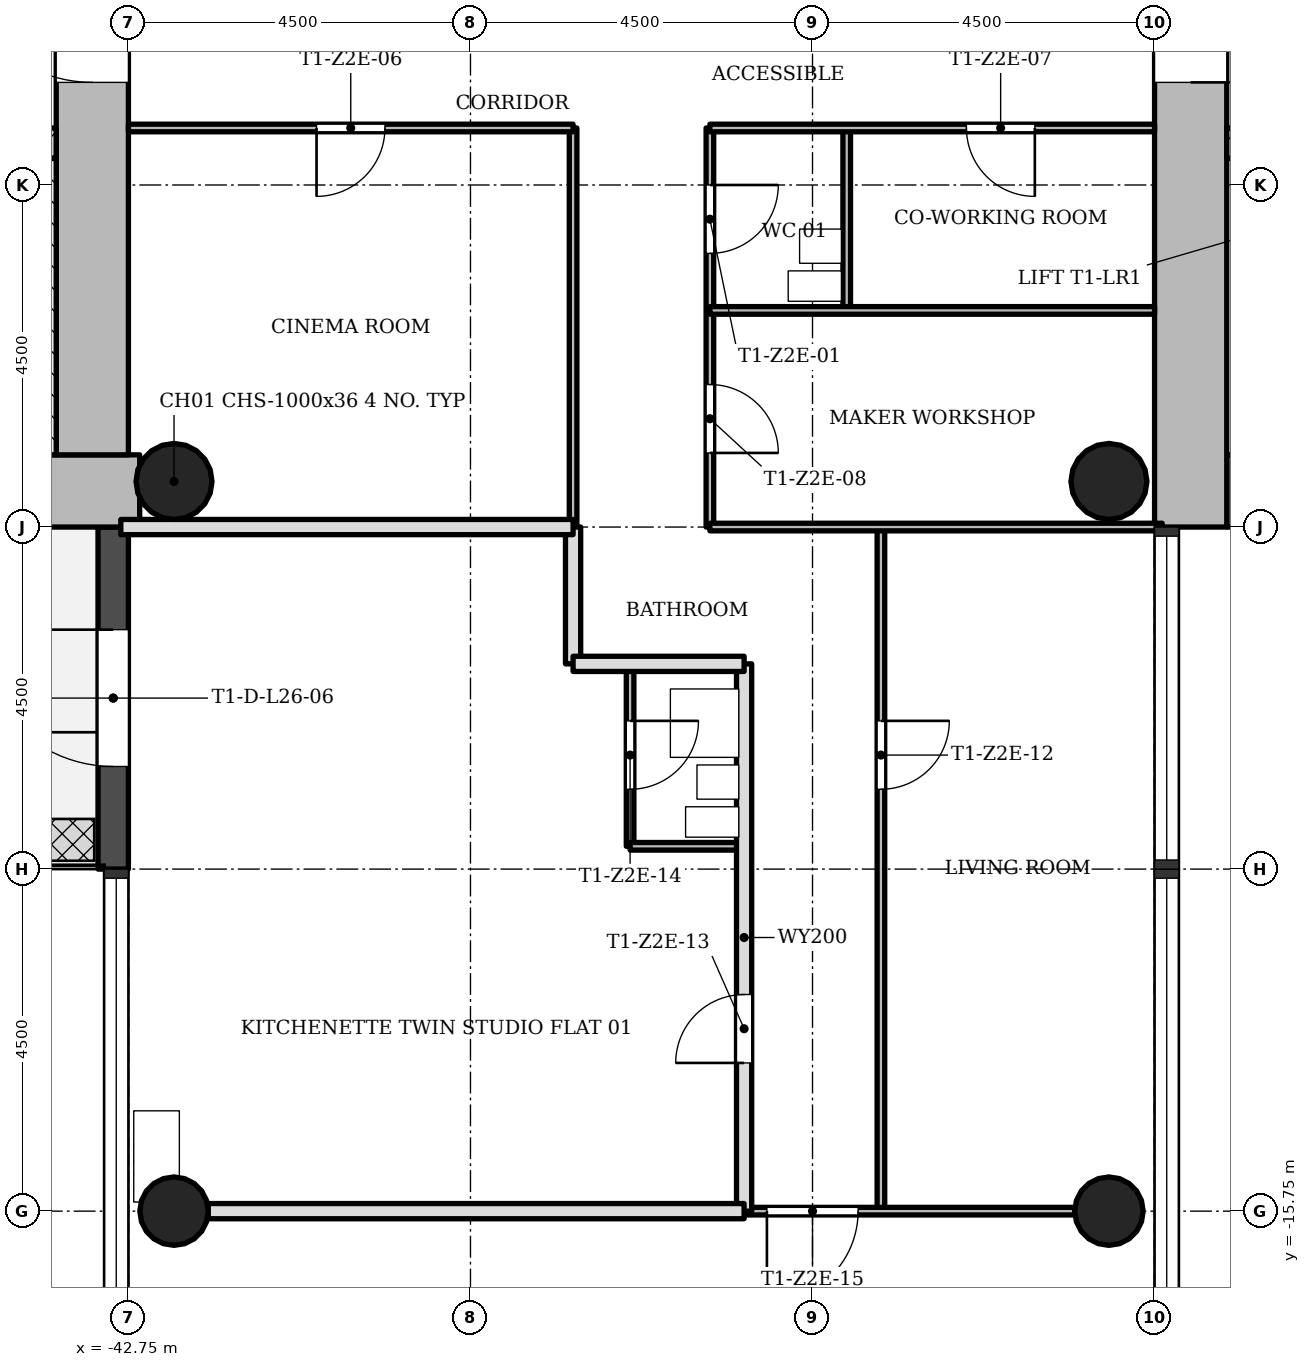
"""IFC4 building model, lengths in metres.
Left out: names, types, materials, properties, quantities, classifications, styles, units other than length and angle.
Written with IfcOpenShell. Run it as: python <this file> out.ifc"""

import sys

from ifc_helpers import new_model, si_unit, direction, frame, frame_2d, origin, origin_2d, place, context, subcontext, project, spatial, rectangle, hollow_circle, extrude, element, fill, save


model = new_model("IFC4")
c1 = context("Model", 3, precision=1e-05, world=origin(), true_north=direction((0.0, 1.0)))
c2 = subcontext(c1, "Body", "Model", "MODEL_VIEW")
j1 = project(units=[si_unit("LENGTHUNIT", "METRE"), si_unit("PLANEANGLEUNIT", "RADIAN")], contexts=[c1])
p1 = place(None, origin())
s1 = spatial("IfcSite", under=j1, at=p1, CompositionType="ELEMENT")
p2 = place(p1, origin())
s2 = spatial("IfcBuilding", under=s1, at=p2, CompositionType="ELEMENT")
p3 = place(p2, frame((0.0, 0.0, 97.0)))
s3 = spatial("IfcBuildingStorey", under=s2, at=p3, CompositionType="ELEMENT", Elevation=97.0)
p4 = place(p3, frame((-28.3, -6.275, 0.0), z_axis=(0.0, 0.0, 1.0), x_axis=(1.0, 0.0, 0.0)))
e1 = element("IfcWall", 1, at=p4, inside=s3, PredefinedType="SHEAR", context=c2, shape_type="SweptSolid", body=[
    extrude(rectangle(XDim=8.05, YDim=0.95, at=frame_2d((4.025, 0.0))), origin(), (0.0, 0.0, 1.0), 3.4),
])
p5 = place(p3, frame((-28.775, 5.8, 0.0), z_axis=(0.0, 0.0, 1.0), x_axis=(0.0, -1.0, 0.0)))
e2 = element("IfcWall", 2, at=p5, inside=s3, PredefinedType="SHEAR", context=c2, shape_type="SweptSolid", body=[
    extrude(rectangle(XDim=12.55, YDim=0.95, at=frame_2d((6.275, 0.0))), origin(), (0.0, 0.0, 1.0), 3.4),
])
p6 = place(p5, frame((4.9, 0.0, 0.0)))
e3 = element("IfcOpeningElement", 3, at=p6, cuts=e2, PredefinedType="OPENING", context=c2, shape_type="SweptSolid", body=[
    extrude(rectangle(XDim=1.8, YDim=2.1, at=frame_2d((0.9, 1.05))), frame((0.0, 0.485, 0.0), z_axis=(0.0, -1.0, 0.0), x_axis=(1.0, 0.0, 0.0)), (0.0, 0.0, 1.0), 0.97),
])
p7 = place(p3, frame((-28.3, -1.7, 0.0), z_axis=(0.0, 0.0, 1.0), x_axis=(1.0, 0.0, 0.0)))
e4 = element("IfcWall", 4, at=p7, inside=s3, PredefinedType="SHEAR", context=c2, shape_type="SweptSolid", body=[
    extrude(rectangle(XDim=7.1, YDim=0.4, at=frame_2d((3.55, 0.0))), origin(), (0.0, 0.0, 1.0), 3.4),
])
p8 = place(p7, frame((0.8, 0.0, 0.0)))
e5 = element("IfcOpeningElement", 5, at=p8, cuts=e4, PredefinedType="OPENING", context=c2, shape_type="SweptSolid", body=[
    extrude(rectangle(XDim=1.1, YDim=2.1, at=frame_2d((0.55, 1.05))), frame((0.0, 0.21, 0.0), z_axis=(0.0, -1.0, 0.0), x_axis=(1.0, 0.0, 0.0)), (0.0, 0.0, 1.0), 0.42),
])
p9 = place(p7, frame((3.0, 0.0, 0.0)))
e6 = element("IfcOpeningElement", 6, at=p9, cuts=e4, PredefinedType="OPENING", context=c2, shape_type="SweptSolid", body=[
    extrude(rectangle(XDim=1.1, YDim=2.1, at=frame_2d((0.55, 1.05))), frame((0.0, 0.21, 0.0), z_axis=(0.0, -1.0, 0.0), x_axis=(1.0, 0.0, 0.0)), (0.0, 0.0, 1.0), 0.42),
])
p10 = place(p7, frame((5.2, 0.0, 0.0)))
e7 = element("IfcOpeningElement", 7, at=p10, cuts=e4, PredefinedType="OPENING", context=c2, shape_type="SweptSolid", body=[
    extrude(rectangle(XDim=1.1, YDim=2.1, at=frame_2d((0.55, 1.05))), frame((0.0, 0.21, 0.0), z_axis=(0.0, -1.0, 0.0), x_axis=(1.0, 0.0, 0.0)), (0.0, 0.0, 1.0), 0.42),
])
p11 = place(p3, frame((-51.298, -6.275, 0.0), z_axis=(0.0, 0.0, 1.0), x_axis=(1.0, 0.0, 0.0)))
e8 = element("IfcWall", 8, at=p11, inside=s3, PredefinedType="SHEAR", context=c2, shape_type="SweptSolid", body=[
    extrude(rectangle(XDim=8.696, YDim=0.95, at=frame_2d((4.348, 0.0))), origin(), (0.0, 0.0, 1.0), 3.4),
])
p12 = place(p3, frame((-43.225, -5.8, 0.0), z_axis=(0.0, 0.0, 1.0), x_axis=(0.0, 1.0, 0.0)))
e9 = element("IfcWall", 9, at=p12, inside=s3, PredefinedType="SHEAR", context=c2, shape_type="SweptSolid", body=[
    extrude(rectangle(XDim=12.55, YDim=0.95, at=frame_2d((6.275, 0.0))), origin(), (0.0, 0.0, 1.0), 3.4),
])
p13 = place(p12, frame((4.9, 0.0, 0.0)))
e10 = element("IfcOpeningElement", 10, at=p13, cuts=e9, PredefinedType="OPENING", context=c2, shape_type="SweptSolid", body=[
    extrude(rectangle(XDim=1.8, YDim=2.1, at=frame_2d((0.9, 1.05))), frame((0.0, 0.485, 0.0), z_axis=(0.0, -1.0, 0.0), x_axis=(1.0, 0.0, 0.0)), (0.0, 0.0, 1.0), 0.97),
])
p14 = place(p3, frame((-50.8, -1.7, 0.0), z_axis=(0.0, 0.0, 1.0), x_axis=(1.0, 0.0, 0.0)))
e11 = element("IfcWall", 11, at=p14, inside=s3, PredefinedType="SHEAR", context=c2, shape_type="SweptSolid", body=[
    extrude(rectangle(XDim=7.1, YDim=0.4, at=frame_2d((3.55, 0.0))), origin(), (0.0, 0.0, 1.0), 3.4),
])
p15 = place(p14, frame((5.5, 0.0, 0.0)))
e12 = element("IfcOpeningElement", 12, at=p15, cuts=e11, PredefinedType="OPENING", context=c2, shape_type="SweptSolid", body=[
    extrude(rectangle(XDim=0.9, YDim=2.1, at=frame_2d((0.45, 1.05))), frame((0.0, 0.21, 0.0), z_axis=(0.0, -1.0, 0.0), x_axis=(1.0, 0.0, 0.0)), (0.0, 0.0, 1.0), 0.42),
])
for number, where, z_axis, x_axis in (
    (13, (-42.15, -15.75, 0.0), (0.0, 0.0, 1.0), (1.0, 0.0, 0.0)),
    (14, (-29.85, -15.75, 0.0), (0.0, 0.0, 1.0), (1.0, 0.0, 0.0)),
):
    element("IfcColumn", number, at=place(p3, frame(where, z_axis=z_axis, x_axis=x_axis)), inside=s3, PredefinedType="COLUMN", context=c2, shape_type="SweptSolid", body=[
        extrude(hollow_circle(Radius=0.45, WallThickness=0.032, at=origin_2d()), origin(), (0.0, 0.0, 1.0), 3.4),
    ])
for number, where, z_axis, x_axis in (
    (15, (-42.15, -6.15, 0.0), (0.0, 0.0, 1.0), (1.0, 0.0, 0.0)),
    (16, (-29.85, -6.15, 0.0), (0.0, 0.0, 1.0), (1.0, 0.0, 0.0)),
):
    element("IfcColumn", number, at=place(p3, frame(where, z_axis=z_axis, x_axis=x_axis)), inside=s3, PredefinedType="COLUMN", context=c2, shape_type="SweptSolid", body=[
        extrude(hollow_circle(Radius=0.5, WallThickness=0.036, at=origin_2d()), origin(), (0.0, 0.0, 1.0), 3.4),
    ])
p16 = place(p3, frame((-42.95, -6.75, -0.02), z_axis=(0.0, 0.0, 1.0), x_axis=(0.0, -1.0, 0.0)))
e17 = element("IfcWall", 17, at=p16, inside=s3, PredefinedType="STANDARD", context=c2, shape_type="SweptSolid", body=[
    extrude(rectangle(XDim=4.5, YDim=0.4, at=frame_2d((2.25, 0.0))), origin(), (0.0, 0.0, 1.0), 3.12),
])
p17 = place(p16, frame((1.35, 0.0, 0.02)))
e18 = element("IfcOpeningElement", 18, at=p17, cuts=e17, PredefinedType="OPENING", context=c2, shape_type="SweptSolid", body=[
    extrude(rectangle(XDim=1.8, YDim=2.1, at=frame_2d((0.9, 1.05))), frame((0.0, 0.21, 0.0), z_axis=(0.0, -1.0, 0.0), x_axis=(1.0, 0.0, 0.0)), (0.0, 0.0, 1.0), 0.42),
])
p18 = place(p3, frame((-36.9, -6.75, 0.0), z_axis=(0.0, 0.0, 1.0), x_axis=(0.0, 1.0, 0.0)))
e19 = element("IfcWall", 19, at=p18, inside=s3, PredefinedType="PARTITIONING", context=c2, shape_type="SweptSolid", body=[
    extrude(rectangle(XDim=5.25, YDim=0.1, at=frame_2d((2.625, 0.0))), origin(), (0.0, 0.0, 1.0), 3.0),
])
p19 = place(p3, frame((-36.9, -8.55, 0.0), z_axis=(0.0, 0.0, 1.0), x_axis=(0.0, 1.0, 0.0)))
e20 = element("IfcWall", 20, at=p19, inside=s3, PredefinedType="SOLIDWALL", context=c2, shape_type="SweptSolid", body=[
    extrude(rectangle(XDim=1.8, YDim=0.2, at=frame_2d((0.9, 0.0))), origin(), (0.0, 0.0, 1.0), 3.0),
])
p20 = place(p3, frame((-36.15, -10.95, 0.0), z_axis=(0.0, 0.0, 1.0), x_axis=(0.0, 1.0, 0.0)))
e21 = element("IfcWall", 21, at=p20, inside=s3, PredefinedType="PARTITIONING", context=c2, shape_type="SweptSolid", body=[
    extrude(rectangle(XDim=2.4, YDim=0.1, at=frame_2d((1.2, 0.0))), origin(), (0.0, 0.0, 1.0), 3.0),
])
p21 = place(p20, frame((0.75, 0.0, 0.0)))
e22 = element("IfcOpeningElement", 22, at=p21, cuts=e21, PredefinedType="OPENING", context=c2, shape_type="SweptSolid", body=[
    extrude(rectangle(XDim=0.9, YDim=2.1, at=frame_2d((0.45, 1.05))), frame((0.0, 0.06, 0.0), z_axis=(0.0, -1.0, 0.0), x_axis=(1.0, 0.0, 0.0)), (0.0, 0.0, 1.0), 0.12),
])
p22 = place(p3, frame((-35.1, -6.75, 0.0), z_axis=(0.0, 0.0, 1.0), x_axis=(0.0, 1.0, 0.0)))
e23 = element("IfcWall", 23, at=p22, inside=s3, PredefinedType="PARTITIONING", context=c2, shape_type="SweptSolid", body=[
    extrude(rectangle(XDim=5.25, YDim=0.1, at=frame_2d((2.625, 0.0))), origin(), (0.0, 0.0, 1.0), 3.0),
])
p23 = place(p22, frame((3.6, 0.0, 0.0)))
e24 = element("IfcOpeningElement", 24, at=p23, cuts=e23, PredefinedType="OPENING", context=c2, shape_type="SweptSolid", body=[
    extrude(rectangle(XDim=0.9, YDim=2.1, at=frame_2d((0.45, 1.05))), frame((0.0, 0.06, 0.0), z_axis=(0.0, -1.0, 0.0), x_axis=(1.0, 0.0, 0.0)), (0.0, 0.0, 1.0), 0.12),
])
p24 = place(p22, frame((0.975, 0.0, 0.0)))
e25 = element("IfcOpeningElement", 25, at=p24, cuts=e23, PredefinedType="OPENING", context=c2, shape_type="SweptSolid", body=[
    extrude(rectangle(XDim=0.9, YDim=2.1, at=frame_2d((0.45, 1.05))), frame((0.0, 0.06, 0.0), z_axis=(0.0, -1.0, 0.0), x_axis=(1.0, 0.0, 0.0)), (0.0, 0.0, 1.0), 0.12),
])
p25 = place(p3, frame((-34.65, -15.75, 0.0), z_axis=(0.0, 0.0, 1.0), x_axis=(0.0, 1.0, 0.0)))
e26 = element("IfcWall", 26, at=p25, inside=s3, PredefinedType="SOLIDWALL", context=c2, shape_type="SweptSolid", body=[
    extrude(rectangle(XDim=7.2, YDim=0.2, at=frame_2d((3.6, 0.0))), origin(), (0.0, 0.0, 1.0), 3.0),
])
p26 = place(p25, frame((1.95, 0.0, 0.0)))
e27 = element("IfcOpeningElement", 27, at=p26, cuts=e26, PredefinedType="OPENING", context=c2, shape_type="SweptSolid", body=[
    extrude(rectangle(XDim=0.9, YDim=2.1, at=frame_2d((0.45, 1.05))), frame((0.0, 0.11, 0.0), z_axis=(0.0, -1.0, 0.0), x_axis=(1.0, 0.0, 0.0)), (0.0, 0.0, 1.0), 0.22),
])
p27 = place(p3, frame((-33.3, -3.9, 0.0), z_axis=(0.0, 0.0, 1.0), x_axis=(0.0, 1.0, 0.0)))
e28 = element("IfcWall", 28, at=p27, inside=s3, PredefinedType="PARTITIONING", context=c2, shape_type="SweptSolid", body=[
    extrude(rectangle(XDim=2.4, YDim=0.1, at=frame_2d((1.2, 0.0))), origin(), (0.0, 0.0, 1.0), 3.0),
])
p28 = place(p3, frame((-32.85, -15.75, 0.0), z_axis=(0.0, 0.0, 1.0), x_axis=(0.0, 1.0, 0.0)))
e29 = element("IfcWall", 29, at=p28, inside=s3, PredefinedType="PARTITIONING", context=c2, shape_type="SweptSolid", body=[
    extrude(rectangle(XDim=9.0, YDim=0.1, at=frame_2d((4.5, 0.0))), origin(), (0.0, 0.0, 1.0), 3.0),
])
p29 = place(p28, frame((5.55, 0.0, 0.0)))
e30 = element("IfcOpeningElement", 30, at=p29, cuts=e29, PredefinedType="OPENING", context=c2, shape_type="SweptSolid", body=[
    extrude(rectangle(XDim=0.9, YDim=2.1, at=frame_2d((0.45, 1.05))), frame((0.0, 0.06, 0.0), z_axis=(0.0, -1.0, 0.0), x_axis=(1.0, 0.0, 0.0)), (0.0, 0.0, 1.0), 0.12),
])
p30 = place(p3, frame((-34.65, -15.75, 0.0), z_axis=(0.0, 0.0, 1.0), x_axis=(1.0, 0.0, 0.0)))
e31 = element("IfcWall", 31, at=p30, inside=s3, PredefinedType="PARTITIONING", context=c2, shape_type="SweptSolid", body=[
    extrude(rectangle(XDim=4.35, YDim=0.1, at=frame_2d((2.175, 0.0))), origin(), (0.0, 0.0, 1.0), 3.0),
])
p31 = place(p30, frame((0.3, 0.0, 0.0)))
e32 = element("IfcOpeningElement", 32, at=p31, cuts=e31, PredefinedType="OPENING", context=c2, shape_type="SweptSolid", body=[
    extrude(rectangle(XDim=1.2, YDim=2.1, at=frame_2d((0.6, 1.05))), frame((0.0, 0.06, 0.0), z_axis=(0.0, -1.0, 0.0), x_axis=(1.0, 0.0, 0.0)), (0.0, 0.0, 1.0), 0.12),
])
p32 = place(p3, frame((-41.7, -15.75, 0.0), z_axis=(0.0, 0.0, 1.0), x_axis=(1.0, 0.0, 0.0)))
e33 = element("IfcWall", 33, at=p32, inside=s3, PredefinedType="SOLIDWALL", context=c2, shape_type="SweptSolid", body=[
    extrude(rectangle(XDim=7.05, YDim=0.2, at=frame_2d((3.525, 0.0))), origin(), (0.0, 0.0, 1.0), 3.0),
])
p33 = place(p3, frame((-36.15, -10.95, 0.0), z_axis=(0.0, 0.0, 1.0), x_axis=(1.0, 0.0, 0.0)))
e34 = element("IfcWall", 34, at=p33, inside=s3, PredefinedType="PARTITIONING", context=c2, shape_type="SweptSolid", body=[
    extrude(rectangle(XDim=1.5, YDim=0.1, at=frame_2d((0.75, 0.0))), origin(), (0.0, 0.0, 1.0), 3.0),
])
p34 = place(p3, frame((-36.9, -8.55, 0.0), z_axis=(0.0, 0.0, 1.0), x_axis=(1.0, 0.0, 0.0)))
e35 = element("IfcWall", 35, at=p34, inside=s3, PredefinedType="SOLIDWALL", context=c2, shape_type="SweptSolid", body=[
    extrude(rectangle(XDim=2.25, YDim=0.2, at=frame_2d((1.125, 0.0))), origin(), (0.0, 0.0, 1.0), 3.0),
])
p35 = place(p3, frame((-35.1, -6.75, 0.0), z_axis=(0.0, 0.0, 1.0), x_axis=(1.0, 0.0, 0.0)))
e36 = element("IfcWall", 36, at=p35, inside=s3, PredefinedType="PARTITIONING", context=c2, shape_type="SweptSolid", body=[
    extrude(rectangle(XDim=5.95, YDim=0.1, at=frame_2d((2.975, 0.0))), origin(), (0.0, 0.0, 1.0), 3.0),
])
p36 = place(p3, frame((-42.85, -6.75, 0.0), z_axis=(0.0, 0.0, 1.0), x_axis=(1.0, 0.0, 0.0)))
e37 = element("IfcWall", 37, at=p36, inside=s3, PredefinedType="SOLIDWALL", context=c2, shape_type="SweptSolid", body=[
    extrude(rectangle(XDim=5.95, YDim=0.2, at=frame_2d((2.975, 0.0))), origin(), (0.0, 0.0, 1.0), 3.0),
])
p37 = place(p3, frame((-35.1, -3.9, 0.0), z_axis=(0.0, 0.0, 1.0), x_axis=(1.0, 0.0, 0.0)))
e38 = element("IfcWall", 38, at=p37, inside=s3, PredefinedType="PARTITIONING", context=c2, shape_type="SweptSolid", body=[
    extrude(rectangle(XDim=5.85, YDim=0.1, at=frame_2d((2.925, 0.0))), origin(), (0.0, 0.0, 1.0), 3.0),
])
p38 = place(p3, frame((-42.75, -1.5, 0.0), z_axis=(0.0, 0.0, 1.0), x_axis=(1.0, 0.0, 0.0)))
e39 = element("IfcWall", 39, at=p38, inside=s3, PredefinedType="PARTITIONING", context=c2, shape_type="SweptSolid", body=[
    extrude(rectangle(XDim=5.85, YDim=0.1, at=frame_2d((2.925, 0.0))), origin(), (0.0, 0.0, 1.0), 3.0),
])
p39 = place(p38, frame((2.475, 0.0, 0.0)))
e40 = element("IfcOpeningElement", 40, at=p39, cuts=e39, PredefinedType="OPENING", context=c2, shape_type="SweptSolid", body=[
    extrude(rectangle(XDim=0.9, YDim=2.1, at=frame_2d((0.45, 1.05))), frame((0.0, 0.06, 0.0), z_axis=(0.0, -1.0, 0.0), x_axis=(1.0, 0.0, 0.0)), (0.0, 0.0, 1.0), 0.12),
])
p40 = place(p3, frame((-35.1, -1.5, 0.0), z_axis=(0.0, 0.0, 1.0), x_axis=(1.0, 0.0, 0.0)))
e41 = element("IfcWall", 41, at=p40, inside=s3, PredefinedType="PARTITIONING", context=c2, shape_type="SweptSolid", body=[
    extrude(rectangle(XDim=5.85, YDim=0.1, at=frame_2d((2.925, 0.0))), origin(), (0.0, 0.0, 1.0), 3.0),
])
p41 = place(p40, frame((3.375, 0.0, 0.0)))
e42 = element("IfcOpeningElement", 42, at=p41, cuts=e41, PredefinedType="OPENING", context=c2, shape_type="SweptSolid", body=[
    extrude(rectangle(XDim=0.9, YDim=2.1, at=frame_2d((0.45, 1.05))), frame((0.0, 0.06, 0.0), z_axis=(0.0, -1.0, 0.0), x_axis=(1.0, 0.0, 0.0)), (0.0, 0.0, 1.0), 0.12),
])
p42 = place(p3, frame((-43.825, -1.9, 0.0), z_axis=(0.0, 0.0, 1.0), x_axis=(0.0, -1.0, 0.0)))
e43 = element("IfcWall", 43, at=p42, inside=s3, PredefinedType="SHEAR", context=c2, shape_type="SweptSolid", body=[
    extrude(rectangle(XDim=3.9, YDim=0.25, at=frame_2d((1.95, 0.0))), origin(), (0.0, 0.0, 1.0), 3.4),
])
p43 = place(p17, origin())
e44 = element("IfcDoor", 44, at=p43, inside=s3, OperationType="SINGLE_SWING_LEFT", PredefinedType="DOOR", context=c2, shape_type="SweptSolid", body=[
    extrude(rectangle(XDim=1.8, YDim=2.1, at=frame_2d((0.9, 1.05))), frame((0.0, 0.025, 0.0), z_axis=(0.0, -1.0, 0.0), x_axis=(1.0, 0.0, 0.0)), (0.0, 0.0, 1.0), 0.05),
])
fill(e18, e44)
p44 = place(p23, origin())
e45 = element("IfcDoor", 45, at=p44, inside=s3, OperationType="SINGLE_SWING_RIGHT", PredefinedType="DOOR", context=c2, shape_type="SweptSolid", body=[
    extrude(rectangle(XDim=0.9, YDim=2.1, at=frame_2d((0.45, 1.05))), frame((0.0, 0.025, 0.0), z_axis=(0.0, -1.0, 0.0), x_axis=(1.0, 0.0, 0.0)), (0.0, 0.0, 1.0), 0.05),
])
fill(e24, e45)
p45 = place(p39, origin())
e46 = element("IfcDoor", 46, at=p45, inside=s3, OperationType="SINGLE_SWING_LEFT", PredefinedType="DOOR", context=c2, shape_type="SweptSolid", body=[
    extrude(rectangle(XDim=0.9, YDim=2.1, at=frame_2d((0.45, 1.05))), frame((0.0, 0.025, 0.0), z_axis=(0.0, -1.0, 0.0), x_axis=(1.0, 0.0, 0.0)), (0.0, 0.0, 1.0), 0.05),
])
fill(e40, e46)
p46 = place(p41, origin())
e47 = element("IfcDoor", 47, at=p46, inside=s3, OperationType="SINGLE_SWING_RIGHT", PredefinedType="DOOR", context=c2, shape_type="SweptSolid", body=[
    extrude(rectangle(XDim=0.9, YDim=2.1, at=frame_2d((0.45, 1.05))), frame((0.0, 0.025, 0.0), z_axis=(0.0, -1.0, 0.0), x_axis=(1.0, 0.0, 0.0)), (0.0, 0.0, 1.0), 0.05),
])
fill(e42, e47)
p47 = place(p24, origin())
e48 = element("IfcDoor", 48, at=p47, inside=s3, OperationType="SINGLE_SWING_LEFT", PredefinedType="DOOR", context=c2, shape_type="SweptSolid", body=[
    extrude(rectangle(XDim=0.9, YDim=2.1, at=frame_2d((0.45, 1.05))), frame((0.0, 0.025, 0.0), z_axis=(0.0, -1.0, 0.0), x_axis=(1.0, 0.0, 0.0)), (0.0, 0.0, 1.0), 0.05),
])
fill(e25, e48)
p48 = place(p29, origin())
e49 = element("IfcDoor", 49, at=p48, inside=s3, OperationType="SINGLE_SWING_RIGHT", PredefinedType="DOOR", context=c2, shape_type="SweptSolid", body=[
    extrude(rectangle(XDim=0.9, YDim=2.1, at=frame_2d((0.45, 1.05))), frame((0.0, 0.025, 0.0), z_axis=(0.0, -1.0, 0.0), x_axis=(1.0, 0.0, 0.0)), (0.0, 0.0, 1.0), 0.05),
])
fill(e30, e49)
p49 = place(p26, origin())
e50 = element("IfcDoor", 50, at=p49, inside=s3, OperationType="SINGLE_SWING_RIGHT", PredefinedType="DOOR", context=c2, shape_type="SweptSolid", body=[
    extrude(rectangle(XDim=0.9, YDim=2.1, at=frame_2d((0.45, 1.05))), frame((0.0, 0.025, 0.0), z_axis=(0.0, -1.0, 0.0), x_axis=(1.0, 0.0, 0.0)), (0.0, 0.0, 1.0), 0.05),
])
fill(e27, e50)
p50 = place(p21, origin())
e51 = element("IfcDoor", 51, at=p50, inside=s3, OperationType="SINGLE_SWING_RIGHT", PredefinedType="DOOR", context=c2, shape_type="SweptSolid", body=[
    extrude(rectangle(XDim=0.9, YDim=2.1, at=frame_2d((0.45, 1.05))), frame((0.0, 0.025, 0.0), z_axis=(0.0, -1.0, 0.0), x_axis=(1.0, 0.0, 0.0)), (0.0, 0.0, 1.0), 0.05),
])
fill(e22, e51)
p51 = place(p31, origin())
e52 = element("IfcDoor", 52, at=p51, inside=s3, OperationType="SINGLE_SWING_LEFT", PredefinedType="DOOR", context=c2, shape_type="SweptSolid", body=[
    extrude(rectangle(XDim=1.2, YDim=2.1, at=frame_2d((0.6, 1.05))), frame((0.0, 0.025, 0.0), z_axis=(0.0, -1.0, 0.0), x_axis=(1.0, 0.0, 0.0)), (0.0, 0.0, 1.0), 0.05),
])
fill(e32, e52)
p52 = place(p6, origin())
e53 = element("IfcDoor", 53, at=p52, inside=s3, OperationType="SINGLE_SWING_LEFT", PredefinedType="DOOR", context=c2, shape_type="SweptSolid", body=[
    extrude(rectangle(XDim=1.8, YDim=2.1, at=frame_2d((0.9, 1.05))), frame((0.0, 0.025, 0.0), z_axis=(0.0, -1.0, 0.0), x_axis=(1.0, 0.0, 0.0)), (0.0, 0.0, 1.0), 0.05),
])
fill(e3, e53)
p53 = place(p13, origin())
e54 = element("IfcDoor", 54, at=p53, inside=s3, OperationType="SINGLE_SWING_LEFT", PredefinedType="DOOR", context=c2, shape_type="SweptSolid", body=[
    extrude(rectangle(XDim=1.8, YDim=2.1, at=frame_2d((0.9, 1.05))), frame((0.0, 0.025, 0.0), z_axis=(0.0, -1.0, 0.0), x_axis=(1.0, 0.0, 0.0)), (0.0, 0.0, 1.0), 0.05),
])
fill(e10, e54)
save(model, sys.argv[1])
